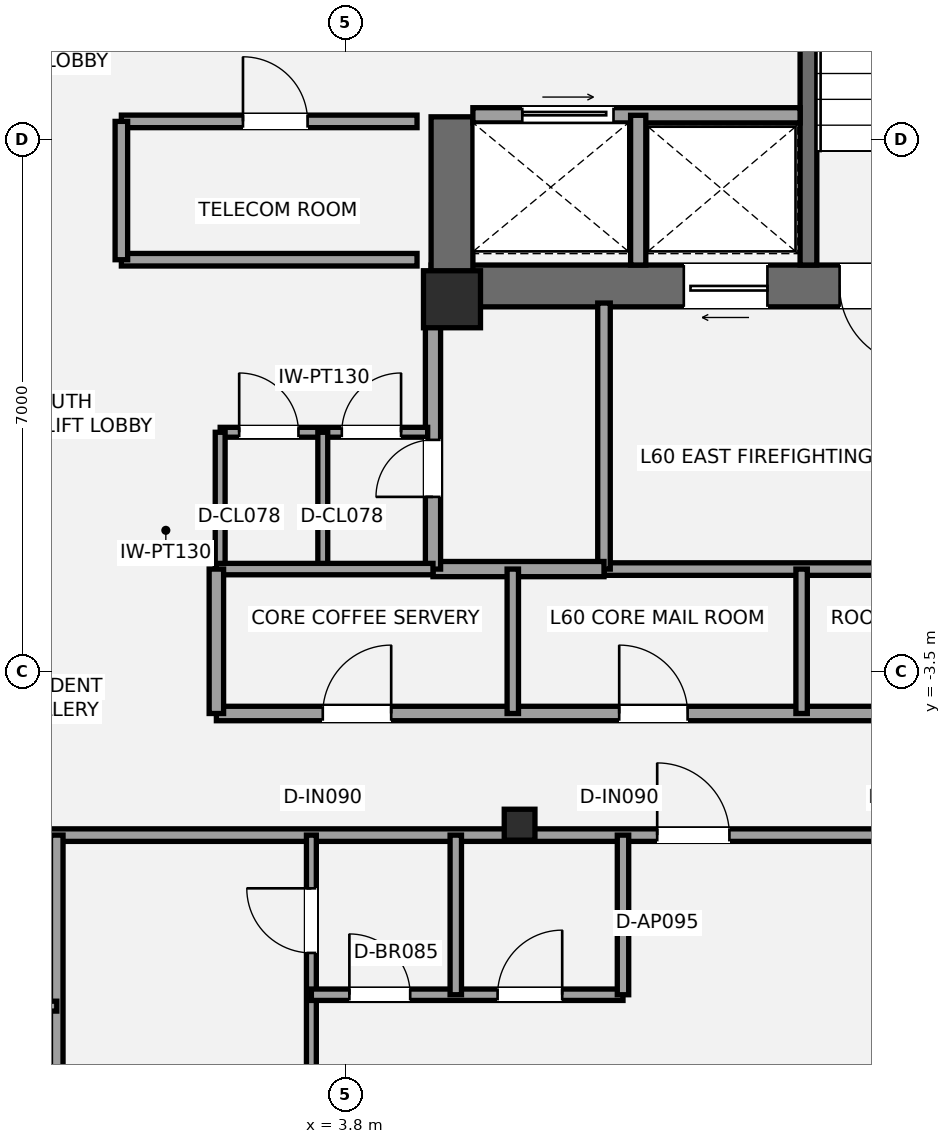
"""IFC4 building model, lengths in metres.
Left out: names, types, materials, properties, quantities, classifications, styles, units other than length and angle.
Written with IfcOpenShell. Run it as: python <this file> out.ifc"""

import sys

from ifc_helpers import new_model, si_unit, direction, frame, frame_2d, origin, origin_2d, place, context, subcontext, project, spatial, rectangle, i_section, extrude, element, fill, save


model = new_model("IFC4")
c1 = context("Model", 3, precision=1e-05, world=origin(), true_north=direction((0.0, 1.0)))
c2 = subcontext(c1, "Body", "Model", "MODEL_VIEW")
j1 = project(units=[si_unit("LENGTHUNIT", "METRE"), si_unit("PLANEANGLEUNIT", "RADIAN")], contexts=[c1])
p1 = place(None, origin())
s1 = spatial("IfcSite", under=j1, at=p1, CompositionType="ELEMENT")
p2 = place(p1, origin())
s2 = spatial("IfcBuilding", under=s1, at=p2, CompositionType="ELEMENT")
p3 = place(p2, frame((0.0, 0.0, 216.3)))
s3 = spatial("IfcBuildingStorey", under=s2, at=p3, CompositionType="ELEMENT", Elevation=216.3)
p4 = place(p3, frame((13.7, 1.575, 0.0), z_axis=(0.0, 0.0, 1.0), x_axis=(-1.0, 0.0, 0.0)))
e1 = element("IfcWall", 1, at=p4, inside=s3, PredefinedType="SHEAR", context=c2, shape_type="SweptSolid", body=[
    extrude(rectangle(XDim=8.775, YDim=0.55, at=frame_2d((4.387, 0.0))), origin(), (0.0, 0.0, 1.0), 3.15),
])
p5 = place(p4, frame((2.35, 0.0, 0.0)))
e2 = element("IfcOpeningElement", 2, at=p5, cuts=e1, PredefinedType="OPENING", context=c2, shape_type="SweptSolid", body=[
    extrude(rectangle(XDim=1.05, YDim=2.15, at=frame_2d((0.525, 1.075))), frame((0.0, 0.285, 0.0), z_axis=(0.0, -1.0, 0.0), x_axis=(1.0, 0.0, 0.0)), (0.0, 0.0, 1.0), 0.57),
])
p6 = place(p4, frame((4.35, 0.0, 0.0)))
e3 = element("IfcOpeningElement", 3, at=p6, cuts=e1, PredefinedType="OPENING", context=c2, shape_type="SweptSolid", body=[
    extrude(rectangle(XDim=1.1, YDim=2.2, at=frame_2d((0.55, 1.1))), frame((0.0, 0.285, 0.0), z_axis=(0.0, -1.0, 0.0), x_axis=(1.0, 0.0, 0.0)), (0.0, 0.0, 1.0), 0.57),
])
p7 = place(p3, frame((5.2, 1.3, 0.0), z_axis=(0.0, 0.0, 1.0), x_axis=(0.0, 1.0, 0.0)))
e4 = element("IfcWall", 4, at=p7, inside=s3, PredefinedType="SHEAR", context=c2, shape_type="SweptSolid", body=[
    extrude(rectangle(XDim=2.5, YDim=0.55, at=frame_2d((1.25, 0.0))), origin(), (0.0, 0.0, 1.0), 3.15),
])
p8 = place(p3, frame((9.89, 1.85, 0.0), z_axis=(0.0, 0.0, 1.0), x_axis=(0.0, 1.0, 0.0)))
e5 = element("IfcWall", 5, at=p8, inside=s3, PredefinedType="SHEAR", context=c2, shape_type="SweptSolid", body=[
    extrude(rectangle(XDim=7.15, YDim=0.22, at=frame_2d((3.575, 0.0))), origin(), (0.0, 0.0, 1.0), 3.15),
])
p9 = place(p3, frame((5.2, 1.4, 0.0), z_axis=(0.0, 0.0, 1.0), x_axis=(1.0, 0.0, 0.0)))
e6 = element("IfcColumn", 6, at=p9, inside=s3, PredefinedType="PILASTER", context=c2, shape_type="SweptSolid", body=[
    extrude(rectangle(XDim=0.75, YDim=0.75, at=origin_2d()), origin(), (0.0, 0.0, 1.0), 3.15),
])
p10 = place(p3, frame((6.09, -5.513, 0.0), z_axis=(0.0, 0.0, 1.0), x_axis=(1.0, 0.0, 0.0)))
e7 = element("IfcColumn", 7, at=p10, inside=s3, PredefinedType="COLUMN", context=c2, shape_type="SweptSolid", body=[
    extrude(i_section(OverallWidth=0.404, OverallDepth=0.407, WebThickness=0.027, FlangeThickness=0.044, at=origin_2d()), origin(), (0.0, 0.0, 1.0), 3.15),
])
p11 = place(p3, frame((7.2, -2.15, 0.0), z_axis=(0.0, 0.0, 1.0), x_axis=(1.0, 0.0, 0.0)))
e8 = element("IfcWall", 8, at=p11, inside=s3, PredefinedType="PARTITIONING", context=c2, shape_type="SweptSolid", body=[
    extrude(rectangle(XDim=6.25, YDim=0.165, at=frame_2d((3.125, 0.0))), origin(), (0.0, 0.0, 1.0), 2.97),
])
p12 = place(p3, frame((7.2, -2.15, 0.0), z_axis=(0.0, 0.0, 1.0), x_axis=(0.0, 1.0, 0.0)))
e9 = element("IfcWall", 9, at=p12, inside=s3, PredefinedType="PARTITIONING", context=c2, shape_type="SweptSolid", body=[
    extrude(rectangle(XDim=3.5, YDim=0.165, at=frame_2d((1.75, 0.0))), origin(), (0.0, 0.0, 1.0), 2.423),
])
p13 = place(p3, frame((4.95, -2.15, 0.0), z_axis=(0.0, 0.0, 1.0), x_axis=(1.0, 0.0, 0.0)))
e10 = element("IfcWall", 10, at=p13, inside=s3, PredefinedType="SOLIDWALL", context=c2, shape_type="SweptSolid", body=[
    extrude(rectangle(XDim=2.25, YDim=0.2, at=frame_2d((1.125, 0.0))), origin(), (0.0, 0.0, 1.0), 2.97),
])
p14 = place(p3, frame((4.95, -2.15, 0.0), z_axis=(0.0, 0.0, 1.0), x_axis=(0.0, 1.0, 0.0)))
e11 = element("IfcWall", 11, at=p14, inside=s3, PredefinedType="SOLIDWALL", context=c2, shape_type="SweptSolid", body=[
    extrude(rectangle(XDim=3.5, YDim=0.2, at=frame_2d((1.75, 0.0))), origin(), (0.0, 0.0, 1.0), 2.423),
])
p15 = place(p14, frame((0.95, 0.0, 0.0)))
e12 = element("IfcOpeningElement", 12, at=p15, cuts=e11, PredefinedType="OPENING", context=c2, shape_type="SweptSolid", body=[
    extrude(rectangle(XDim=0.75, YDim=2.1, at=frame_2d((0.375, 1.05))), frame((0.0, 0.11, 0.0), z_axis=(0.0, -1.0, 0.0), x_axis=(1.0, 0.0, 0.0)), (0.0, 0.0, 1.0), 0.22),
])
p16 = place(p3, frame((2.15, -0.35, 0.0), z_axis=(0.0, 0.0, 1.0), x_axis=(1.0, 0.0, 0.0)))
e13 = element("IfcWall", 13, at=p16, inside=s3, PredefinedType="PARTITIONING", context=c2, shape_type="SweptSolid", body=[
    extrude(rectangle(XDim=2.73, YDim=0.13, at=frame_2d((1.365, 0.0))), origin(), (0.0, 0.0, 1.0), 2.97),
])
p17 = place(p16, frame((0.25, 0.0, 0.0)))
e14 = element("IfcOpeningElement", 14, at=p17, cuts=e13, PredefinedType="OPENING", context=c2, shape_type="SweptSolid", body=[
    extrude(rectangle(XDim=0.78, YDim=2.1, at=frame_2d((0.39, 1.05))), frame((0.0, 0.075, 0.0), z_axis=(0.0, -1.0, 0.0), x_axis=(1.0, 0.0, 0.0)), (0.0, 0.0, 1.0), 0.15),
])
p18 = place(p16, frame((1.6, 0.0, 0.0)))
e15 = element("IfcOpeningElement", 15, at=p18, cuts=e13, PredefinedType="OPENING", context=c2, shape_type="SweptSolid", body=[
    extrude(rectangle(XDim=0.78, YDim=2.1, at=frame_2d((0.39, 1.05))), frame((0.0, 0.075, 0.0), z_axis=(0.0, -1.0, 0.0), x_axis=(1.0, 0.0, 0.0)), (0.0, 0.0, 1.0), 0.15),
])
for number, where, z_axis, x_axis in (
    (16, (2.15, -2.15, 0.0), (0.0, 0.0, 1.0), (0.0, 1.0, 0.0)),
    (17, (3.5, -2.15, 0.0), (0.0, 0.0, 1.0), (0.0, 1.0, 0.0)),
):
    element("IfcWall", number, at=place(p3, frame(where, z_axis=z_axis, x_axis=x_axis)), inside=s3, PredefinedType="PARTITIONING", context=c2, shape_type="SweptSolid", body=[
        extrude(rectangle(XDim=1.8, YDim=0.13, at=frame_2d((0.9, 0.0))), origin(), (0.0, 0.0, 1.0), 2.97),
    ])
p19 = place(p3, frame((5.475, 3.82, 0.0), z_axis=(0.0, 0.0, 1.0), x_axis=(1.0, 0.0, 0.0)))
e18 = element("IfcWall", 18, at=p19, inside=s3, PredefinedType="SOLIDWALL", context=c2, shape_type="SweptSolid", body=[
    extrude(rectangle(XDim=4.305, YDim=0.2, at=frame_2d((2.152, 0.0))), origin(), (0.0, 0.0, 1.0), 2.97),
])
p20 = place(p19, frame((0.65, 0.0, 0.0)))
e19 = element("IfcOpeningElement", 19, at=p20, cuts=e18, PredefinedType="OPENING", context=c2, shape_type="SweptSolid", body=[
    extrude(rectangle(XDim=1.2, YDim=2.2, at=frame_2d((0.6, 1.1))), frame((0.0, 0.11, 0.0), z_axis=(0.0, -1.0, 0.0), x_axis=(1.0, 0.0, 0.0)), (0.0, 0.0, 1.0), 0.22),
])
p21 = place(p3, frame((7.65, 1.85, 0.0), z_axis=(0.0, 0.0, 1.0), x_axis=(0.0, 1.0, 0.0)))
e20 = element("IfcWall", 20, at=p21, inside=s3, PredefinedType="SOLIDWALL", context=c2, shape_type="SweptSolid", body=[
    extrude(rectangle(XDim=1.97, YDim=0.2, at=frame_2d((0.985, 0.0))), origin(), (0.0, 0.0, 1.0), 2.97),
])
p22 = place(p3, frame((0.85, 1.92, 0.0), z_axis=(0.0, 0.0, 1.0), x_axis=(1.0, 0.0, 0.0)))
e21 = element("IfcWall", 21, at=p22, inside=s3, PredefinedType="PARTITIONING", context=c2, shape_type="SweptSolid", body=[
    extrude(rectangle(XDim=3.89, YDim=0.165, at=frame_2d((1.945, 0.0))), origin(), (0.0, 0.0, 1.0), 2.11),
])
p23 = place(p3, frame((0.85, 3.74, 0.0), z_axis=(0.0, 0.0, 1.0), x_axis=(1.0, 0.0, 0.0)))
e22 = element("IfcWall", 22, at=p23, inside=s3, PredefinedType="PARTITIONING", context=c2, shape_type="SweptSolid", body=[
    extrude(rectangle(XDim=3.89, YDim=0.165, at=frame_2d((1.945, 0.0))), origin(), (0.0, 0.0, 1.0), 2.97),
])
p24 = place(p23, frame((1.6, 0.0, 0.0)))
e23 = element("IfcOpeningElement", 23, at=p24, cuts=e22, PredefinedType="OPENING", context=c2, shape_type="SweptSolid", body=[
    extrude(rectangle(XDim=0.85, YDim=2.1, at=frame_2d((0.425, 1.05))), frame((0.0, 0.093, 0.0), z_axis=(0.0, -1.0, 0.0), x_axis=(1.0, 0.0, 0.0)), (0.0, 0.0, 1.0), 0.185),
])
p25 = place(p3, frame((0.85, 1.92, 0.0), z_axis=(0.0, 0.0, 1.0), x_axis=(0.0, 1.0, 0.0)))
e24 = element("IfcWall", 24, at=p25, inside=s3, PredefinedType="PARTITIONING", context=c2, shape_type="SweptSolid", body=[
    extrude(rectangle(XDim=1.82, YDim=0.165, at=frame_2d((0.91, 0.0))), origin(), (0.0, 0.0, 1.0), 2.97),
])
p26 = place(p3, frame((2.1, -4.05, 0.0), z_axis=(0.0, 0.0, 1.0), x_axis=(1.0, 0.0, 0.0)))
e25 = element("IfcWall", 25, at=p26, inside=s3, PredefinedType="PLUMBINGWALL", context=c2, shape_type="SweptSolid", body=[
    extrude(rectangle(XDim=11.35, YDim=0.19, at=frame_2d((5.675, 0.0))), origin(), (0.0, 0.0, 1.0), 2.357),
])
p27 = place(p26, frame((1.4, 0.0, 0.0)))
e26 = element("IfcOpeningElement", 26, at=p27, cuts=e25, PredefinedType="OPENING", context=c2, shape_type="SweptSolid", body=[
    extrude(rectangle(XDim=0.9, YDim=2.1, at=frame_2d((0.45, 1.05))), frame((0.0, 0.105, 0.0), z_axis=(0.0, -1.0, 0.0), x_axis=(1.0, 0.0, 0.0)), (0.0, 0.0, 1.0), 0.21),
])
p28 = place(p26, frame((5.3, 0.0, 0.0)))
e27 = element("IfcOpeningElement", 27, at=p28, cuts=e25, PredefinedType="OPENING", context=c2, shape_type="SweptSolid", body=[
    extrude(rectangle(XDim=0.9, YDim=2.1, at=frame_2d((0.45, 1.05))), frame((0.0, 0.105, 0.0), z_axis=(0.0, -1.0, 0.0), x_axis=(1.0, 0.0, 0.0)), (0.0, 0.0, 1.0), 0.21),
])
p29 = place(p26, frame((9.1, 0.0, 0.0)))
e28 = element("IfcOpeningElement", 28, at=p29, cuts=e25, PredefinedType="OPENING", context=c2, shape_type="SweptSolid", body=[
    extrude(rectangle(XDim=0.9, YDim=2.1, at=frame_2d((0.45, 1.05))), frame((0.0, 0.105, 0.0), z_axis=(0.0, -1.0, 0.0), x_axis=(1.0, 0.0, 0.0)), (0.0, 0.0, 1.0), 0.21),
])
p30 = place(p3, frame((2.1, -2.15, 0.0), z_axis=(0.0, 0.0, 1.0), x_axis=(1.0, 0.0, 0.0)))
e29 = element("IfcWall", 29, at=p30, inside=s3, PredefinedType="PLUMBINGWALL", context=c2, shape_type="SweptSolid", body=[
    extrude(rectangle(XDim=2.85, YDim=0.15, at=frame_2d((1.425, 0.0))), origin(), (0.0, 0.0, 1.0), 2.97),
])
p31 = place(p3, frame((2.1, -4.05, 0.0), z_axis=(0.0, 0.0, 1.0), x_axis=(0.0, 1.0, 0.0)))
e30 = element("IfcWall", 30, at=p31, inside=s3, PredefinedType="PLUMBINGWALL", context=c2, shape_type="SweptSolid", body=[
    extrude(rectangle(XDim=1.9, YDim=0.19, at=frame_2d((0.95, 0.0))), origin(), (0.0, 0.0, 1.0), 2.97),
])
p32 = place(p3, frame((6.0, -4.05, 0.0), z_axis=(0.0, 0.0, 1.0), x_axis=(0.0, 1.0, 0.0)))
e31 = element("IfcWall", 31, at=p32, inside=s3, PredefinedType="PLUMBINGWALL", context=c2, shape_type="SweptSolid", body=[
    extrude(rectangle(XDim=1.9, YDim=0.15, at=frame_2d((0.95, 0.0))), origin(), (0.0, 0.0, 1.0), 2.431),
])
p33 = place(p3, frame((9.8, -4.05, 0.0), z_axis=(0.0, 0.0, 1.0), x_axis=(0.0, 1.0, 0.0)))
e32 = element("IfcWall", 32, at=p33, inside=s3, PredefinedType="PLUMBINGWALL", context=c2, shape_type="SweptSolid", body=[
    extrude(rectangle(XDim=1.9, YDim=0.15, at=frame_2d((0.95, 0.0))), origin(), (0.0, 0.0, 1.0), 2.97),
])
p34 = place(p3, frame((-20.622, -5.65, 0.0), z_axis=(0.0, 0.0, 1.0), x_axis=(1.0, 0.0, 0.0)))
e33 = element("IfcWall", 33, at=p34, inside=s3, PredefinedType="PARTITIONING", context=c2, shape_type="SweptSolid", body=[
    extrude(rectangle(XDim=41.244, YDim=0.165, at=frame_2d((20.622, 0.0))), origin(), (0.0, 0.0, 1.0), 2.357),
])
p35 = place(p34, frame((1.554, 0.0, 0.0)))
e34 = element("IfcOpeningElement", 34, at=p35, cuts=e33, PredefinedType="OPENING", context=c2, shape_type="SweptSolid", body=[
    extrude(rectangle(XDim=1.0, YDim=2.15, at=frame_2d((0.5, 1.075))), frame((0.0, 0.093, 0.0), z_axis=(0.0, -1.0, 0.0), x_axis=(1.0, 0.0, 0.0)), (0.0, 0.0, 1.0), 0.185),
])
p36 = place(p34, frame((38.69, 0.0, 0.0)))
e35 = element("IfcOpeningElement", 35, at=p36, cuts=e33, PredefinedType="OPENING", context=c2, shape_type="SweptSolid", body=[
    extrude(rectangle(XDim=1.0, YDim=2.15, at=frame_2d((0.5, 1.075))), frame((0.0, 0.093, 0.0), z_axis=(0.0, -1.0, 0.0), x_axis=(1.0, 0.0, 0.0)), (0.0, 0.0, 1.0), 0.185),
])
p37 = place(p34, frame((14.932, 0.0, 0.0)))
e36 = element("IfcOpeningElement", 36, at=p37, cuts=e33, PredefinedType="OPENING", context=c2, shape_type="SweptSolid", body=[
    extrude(rectangle(XDim=0.95, YDim=2.15, at=frame_2d((0.475, 1.075))), frame((0.0, 0.093, 0.0), z_axis=(0.0, -1.0, 0.0), x_axis=(1.0, 0.0, 0.0)), (0.0, 0.0, 1.0), 0.185),
])
p38 = place(p34, frame((28.522, 0.0, 0.0)))
e37 = element("IfcOpeningElement", 37, at=p38, cuts=e33, PredefinedType="OPENING", context=c2, shape_type="SweptSolid", body=[
    extrude(rectangle(XDim=0.95, YDim=2.15, at=frame_2d((0.475, 1.075))), frame((0.0, 0.093, 0.0), z_axis=(0.0, -1.0, 0.0), x_axis=(1.0, 0.0, 0.0)), (0.0, 0.0, 1.0), 0.185),
])
p39 = place(p3, frame((0.0, -15.412, 0.0), z_axis=(0.0, 0.0, 1.0), x_axis=(0.0, 1.0, 0.0)))
e38 = element("IfcWall", 38, at=p39, inside=s3, PredefinedType="PARTITIONING", context=c2, shape_type="SweptSolid", body=[
    extrude(rectangle(XDim=9.762, YDim=0.165, at=frame_2d((4.881, 0.0))), origin(), (0.0, 0.0, 1.0), 2.423),
])
p40 = place(p3, frame((-3.35, -7.9, 0.0), z_axis=(0.0, 0.0, 1.0), x_axis=(1.0, 0.0, 0.0)))
e39 = element("IfcWall", 39, at=p40, inside=s3, PredefinedType="PARTITIONING", context=c2, shape_type="SweptSolid", body=[
    extrude(rectangle(XDim=3.35, YDim=0.13, at=frame_2d((1.675, 0.0))), origin(), (0.0, 0.0, 1.0), 2.423),
])
p41 = place(p40, frame((0.8, 0.0, 0.0)))
e40 = element("IfcOpeningElement", 40, at=p41, cuts=e39, PredefinedType="OPENING", context=c2, shape_type="SweptSolid", body=[
    extrude(rectangle(XDim=0.85, YDim=2.1, at=frame_2d((0.425, 1.05))), frame((0.0, 0.075, 0.0), z_axis=(0.0, -1.0, 0.0), x_axis=(1.0, 0.0, 0.0)), (0.0, 0.0, 1.0), 0.15),
])
p42 = place(p3, frame((3.35, -15.196, 0.0), z_axis=(0.0, 0.0, 1.0), x_axis=(0.0, 1.0, 0.0)))
e41 = element("IfcWall", 41, at=p42, inside=s3, PredefinedType="PARTITIONING", context=c2, shape_type="SweptSolid", body=[
    extrude(rectangle(XDim=9.546, YDim=0.13, at=frame_2d((4.773, 0.0))), origin(), (0.0, 0.0, 1.0), 2.423),
])
p43 = place(p42, frame((7.996, 0.0, 0.0)))
e42 = element("IfcOpeningElement", 42, at=p43, cuts=e41, PredefinedType="OPENING", context=c2, shape_type="SweptSolid", body=[
    extrude(rectangle(XDim=0.85, YDim=2.1, at=frame_2d((0.425, 1.05))), frame((0.0, 0.075, 0.0), z_axis=(0.0, -1.0, 0.0), x_axis=(1.0, 0.0, 0.0)), (0.0, 0.0, 1.0), 0.15),
])
p44 = place(p3, frame((3.35, -7.75, 0.0), z_axis=(0.0, 0.0, 1.0), x_axis=(1.0, 0.0, 0.0)))
e43 = element("IfcWall", 43, at=p44, inside=s3, PredefinedType="PLUMBINGWALL", context=c2, shape_type="SweptSolid", body=[
    extrude(rectangle(XDim=4.1, YDim=0.15, at=frame_2d((2.05, 0.0))), origin(), (0.0, 0.0, 1.0), 2.97),
])
p45 = place(p44, frame((0.5, 0.0, 0.0)))
e44 = element("IfcOpeningElement", 44, at=p45, cuts=e43, PredefinedType="OPENING", context=c2, shape_type="SweptSolid", body=[
    extrude(rectangle(XDim=0.8, YDim=2.1, at=frame_2d((0.4, 1.05))), frame((0.0, 0.085, 0.0), z_axis=(0.0, -1.0, 0.0), x_axis=(1.0, 0.0, 0.0)), (0.0, 0.0, 1.0), 0.17),
])
p46 = place(p44, frame((2.45, 0.0, 0.0)))
e45 = element("IfcOpeningElement", 45, at=p46, cuts=e43, PredefinedType="OPENING", context=c2, shape_type="SweptSolid", body=[
    extrude(rectangle(XDim=0.85, YDim=2.1, at=frame_2d((0.425, 1.05))), frame((0.0, 0.085, 0.0), z_axis=(0.0, -1.0, 0.0), x_axis=(1.0, 0.0, 0.0)), (0.0, 0.0, 1.0), 0.17),
])
for number, where, z_axis, x_axis in (
    (46, (5.25, -7.75, 0.0), (0.0, 0.0, 1.0), (0.0, 1.0, 0.0)),
    (47, (7.45, -7.75, 0.0), (0.0, 0.0, 1.0), (0.0, 1.0, 0.0)),
):
    element("IfcWall", number, at=place(p3, frame(where, z_axis=z_axis, x_axis=x_axis)), inside=s3, PredefinedType="PLUMBINGWALL", context=c2, shape_type="SweptSolid", body=[
        extrude(rectangle(XDim=2.1, YDim=0.15, at=frame_2d((1.05, 0.0))), origin(), (0.0, 0.0, 1.0), 2.97),
    ])
p47 = place(p5, origin())
e48 = element("IfcDoor", 48, at=p47, inside=s3, OperationType="SINGLE_SWING_LEFT", PredefinedType="DOOR", context=c2, shape_type="SweptSolid", body=[
    extrude(rectangle(XDim=1.05, YDim=2.15, at=frame_2d((0.525, 1.075))), frame((0.0, 0.025, 0.0), z_axis=(0.0, -1.0, 0.0), x_axis=(1.0, 0.0, 0.0)), (0.0, 0.0, 1.0), 0.05),
])
fill(e2, e48)
p48 = place(p15, origin())
e49 = element("IfcDoor", 49, at=p48, inside=s3, OperationType="SINGLE_SWING_LEFT", PredefinedType="DOOR", context=c2, shape_type="SweptSolid", body=[
    extrude(rectangle(XDim=0.75, YDim=2.1, at=frame_2d((0.375, 1.05))), frame((0.0, 0.025, 0.0), z_axis=(0.0, -1.0, 0.0), x_axis=(1.0, 0.0, 0.0)), (0.0, 0.0, 1.0), 0.05),
])
fill(e12, e49)
p49 = place(p17, origin())
e50 = element("IfcDoor", 50, at=p49, inside=s3, OperationType="SINGLE_SWING_LEFT", PredefinedType="DOOR", context=c2, shape_type="SweptSolid", body=[
    extrude(rectangle(XDim=0.78, YDim=2.1, at=frame_2d((0.39, 1.05))), frame((0.0, 0.025, 0.0), z_axis=(0.0, -1.0, 0.0), x_axis=(1.0, 0.0, 0.0)), (0.0, 0.0, 1.0), 0.05),
])
fill(e14, e50)
p50 = place(p18, origin())
e51 = element("IfcDoor", 51, at=p50, inside=s3, OperationType="SINGLE_SWING_RIGHT", PredefinedType="DOOR", context=c2, shape_type="SweptSolid", body=[
    extrude(rectangle(XDim=0.78, YDim=2.1, at=frame_2d((0.39, 1.05))), frame((0.0, 0.025, 0.0), z_axis=(0.0, -1.0, 0.0), x_axis=(1.0, 0.0, 0.0)), (0.0, 0.0, 1.0), 0.05),
])
fill(e15, e51)
p51 = place(p6, origin())
e52 = element("IfcDoor", 52, at=p51, inside=s3, OperationType="SLIDING_TO_LEFT", PredefinedType="DOOR", context=c2, shape_type="SweptSolid", body=[
    extrude(rectangle(XDim=1.1, YDim=2.2, at=frame_2d((0.55, 1.1))), frame((0.0, 0.025, 0.0), z_axis=(0.0, -1.0, 0.0), x_axis=(1.0, 0.0, 0.0)), (0.0, 0.0, 1.0), 0.05),
])
fill(e3, e52)
p52 = place(p20, origin())
e53 = element("IfcDoor", 53, at=p52, inside=s3, OperationType="SLIDING_TO_RIGHT", PredefinedType="DOOR", context=c2, shape_type="SweptSolid", body=[
    extrude(rectangle(XDim=1.2, YDim=2.2, at=frame_2d((0.6, 1.1))), frame((0.0, 0.025, 0.0), z_axis=(0.0, -1.0, 0.0), x_axis=(1.0, 0.0, 0.0)), (0.0, 0.0, 1.0), 0.05),
])
fill(e19, e53)
p53 = place(p24, origin())
e54 = element("IfcDoor", 54, at=p53, inside=s3, OperationType="SINGLE_SWING_LEFT", PredefinedType="DOOR", context=c2, shape_type="SweptSolid", body=[
    extrude(rectangle(XDim=0.85, YDim=2.1, at=frame_2d((0.425, 1.05))), frame((0.0, 0.025, 0.0), z_axis=(0.0, -1.0, 0.0), x_axis=(1.0, 0.0, 0.0)), (0.0, 0.0, 1.0), 0.05),
])
fill(e23, e54)
p54 = place(p27, origin())
e55 = element("IfcDoor", 55, at=p54, inside=s3, OperationType="SINGLE_SWING_RIGHT", PredefinedType="DOOR", context=c2, shape_type="SweptSolid", body=[
    extrude(rectangle(XDim=0.9, YDim=2.1, at=frame_2d((0.45, 1.05))), frame((0.0, 0.025, 0.0), z_axis=(0.0, -1.0, 0.0), x_axis=(1.0, 0.0, 0.0)), (0.0, 0.0, 1.0), 0.05),
])
fill(e26, e55)
p55 = place(p28, origin())
e56 = element("IfcDoor", 56, at=p55, inside=s3, OperationType="SINGLE_SWING_LEFT", PredefinedType="DOOR", context=c2, shape_type="SweptSolid", body=[
    extrude(rectangle(XDim=0.9, YDim=2.1, at=frame_2d((0.45, 1.05))), frame((0.0, 0.025, 0.0), z_axis=(0.0, -1.0, 0.0), x_axis=(1.0, 0.0, 0.0)), (0.0, 0.0, 1.0), 0.05),
])
fill(e27, e56)
p56 = place(p43, origin())
e57 = element("IfcDoor", 57, at=p56, inside=s3, OperationType="SINGLE_SWING_RIGHT", PredefinedType="DOOR", context=c2, shape_type="SweptSolid", body=[
    extrude(rectangle(XDim=0.85, YDim=2.1, at=frame_2d((0.425, 1.05))), frame((0.0, 0.025, 0.0), z_axis=(0.0, -1.0, 0.0), x_axis=(1.0, 0.0, 0.0)), (0.0, 0.0, 1.0), 0.05),
])
fill(e42, e57)
p57 = place(p45, origin())
e58 = element("IfcDoor", 58, at=p57, inside=s3, OperationType="SINGLE_SWING_LEFT", PredefinedType="DOOR", context=c2, shape_type="SweptSolid", body=[
    extrude(rectangle(XDim=0.8, YDim=2.1, at=frame_2d((0.4, 1.05))), frame((0.0, 0.025, 0.0), z_axis=(0.0, -1.0, 0.0), x_axis=(1.0, 0.0, 0.0)), (0.0, 0.0, 1.0), 0.05),
])
fill(e44, e58)
p58 = place(p46, origin())
e59 = element("IfcDoor", 59, at=p58, inside=s3, OperationType="SINGLE_SWING_RIGHT", PredefinedType="DOOR", context=c2, shape_type="SweptSolid", body=[
    extrude(rectangle(XDim=0.85, YDim=2.1, at=frame_2d((0.425, 1.05))), frame((0.0, 0.025, 0.0), z_axis=(0.0, -1.0, 0.0), x_axis=(1.0, 0.0, 0.0)), (0.0, 0.0, 1.0), 0.05),
])
fill(e45, e59)
p59 = place(p38, origin())
e60 = element("IfcDoor", 60, at=p59, inside=s3, OperationType="SINGLE_SWING_LEFT", PredefinedType="DOOR", context=c2, shape_type="SweptSolid", body=[
    extrude(rectangle(XDim=0.95, YDim=2.15, at=frame_2d((0.475, 1.075))), frame((0.0, 0.025, 0.0), z_axis=(0.0, -1.0, 0.0), x_axis=(1.0, 0.0, 0.0)), (0.0, 0.0, 1.0), 0.05),
])
fill(e37, e60)
save(model, sys.argv[1])
